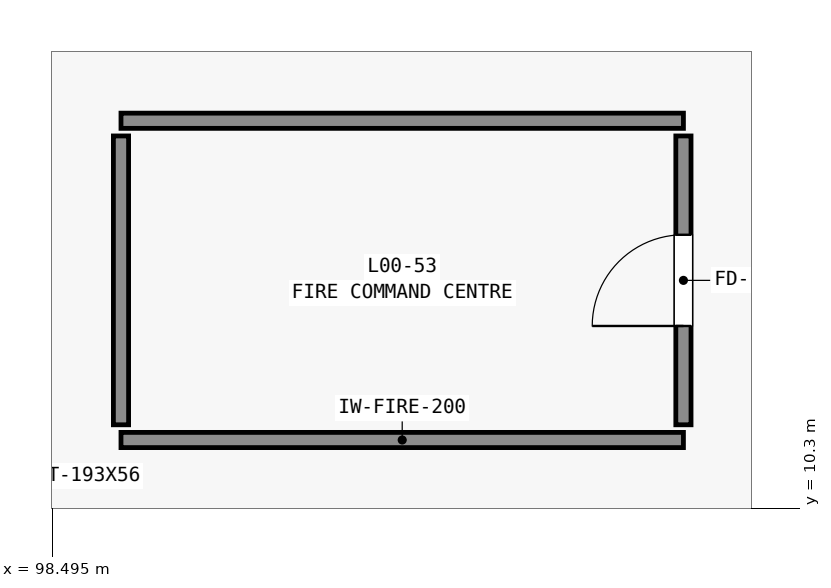
"""IFC4 building model, lengths in metres.
Left out: names, types, materials, properties, quantities, classifications, styles, units other than length and angle.
Written with IfcOpenShell. Run it as: python <this file> out.ifc"""

import sys

from ifc_helpers import new_model, si_unit, direction, frame, frame_2d, origin, place, context, subcontext, project, spatial, rectangle, extrude, element, fill, save


model = new_model("IFC4")
c1 = context("Model", 3, precision=1e-05, world=origin(), true_north=direction((0.0, 1.0)))
c2 = subcontext(c1, "Body", "Model", "MODEL_VIEW")
j1 = project(units=[si_unit("LENGTHUNIT", "METRE"), si_unit("PLANEANGLEUNIT", "RADIAN")], contexts=[c1])
p1 = place(None, origin())
s1 = spatial("IfcSite", under=j1, at=p1, CompositionType="ELEMENT")
p2 = place(p1, origin())
s2 = spatial("IfcBuilding", under=s1, at=p2, CompositionType="ELEMENT")
p3 = place(p2, origin())
s3 = spatial("IfcBuildingStorey", under=s2, at=p3, CompositionType="ELEMENT", Elevation=0.0)
for number, where, z_axis, x_axis in (
    (1, (99.4, 11.2, 0.0), (0.0, 0.0, 1.0), (1.0, 0.0, 0.0)),
    (2, (99.4, 15.4, 0.0), (0.0, 0.0, 1.0), (1.0, 0.0, 0.0)),
):
    element("IfcWall", number, at=place(p3, frame(where, z_axis=z_axis, x_axis=x_axis)), inside=s3, PredefinedType="STANDARD", context=c2, shape_type="SweptSolid", body=[
        extrude(rectangle(XDim=7.4, YDim=0.2, at=frame_2d((3.7, 0.0))), origin(), (0.0, 0.0, 1.0), 5.028),
    ])
p4 = place(p3, frame((99.4, 11.4, 0.0), z_axis=(0.0, 0.0, 1.0), x_axis=(0.0, 1.0, 0.0)))
e3 = element("IfcWall", 3, at=p4, inside=s3, PredefinedType="STANDARD", context=c2, shape_type="SweptSolid", body=[
    extrude(rectangle(XDim=3.8, YDim=0.2, at=frame_2d((1.9, 0.0))), origin(), (0.0, 0.0, 1.0), 5.028),
])
p5 = place(p3, frame((106.8, 11.4, 0.0), z_axis=(0.0, 0.0, 1.0), x_axis=(0.0, 1.0, 0.0)))
e4 = element("IfcWall", 4, at=p5, inside=s3, PredefinedType="STANDARD", context=c2, shape_type="SweptSolid", body=[
    extrude(rectangle(XDim=3.8, YDim=0.2, at=frame_2d((1.9, 0.0))), origin(), (0.0, 0.0, 1.0), 5.64),
])
p6 = place(p5, frame((1.3, 0.0, 0.0)))
e5 = element("IfcOpeningElement", 5, at=p6, cuts=e4, PredefinedType="OPENING", context=c2, shape_type="SweptSolid", body=[
    extrude(rectangle(XDim=1.2, YDim=2.2, at=frame_2d((0.6, 1.1))), frame((0.0, 0.11, 0.0), z_axis=(0.0, -1.0, 0.0), x_axis=(1.0, 0.0, 0.0)), (0.0, 0.0, 1.0), 0.22),
])
p7 = place(p6, origin())
e6 = element("IfcDoor", 6, at=p7, inside=s3, OperationType="SINGLE_SWING_LEFT", PredefinedType="DOOR", context=c2, shape_type="SweptSolid", body=[
    extrude(rectangle(XDim=1.2, YDim=2.2, at=frame_2d((0.6, 1.1))), frame((0.0, 0.025, 0.0), z_axis=(0.0, -1.0, 0.0), x_axis=(1.0, 0.0, 0.0)), (0.0, 0.0, 1.0), 0.05),
])
fill(e5, e6)
save(model, sys.argv[1])
